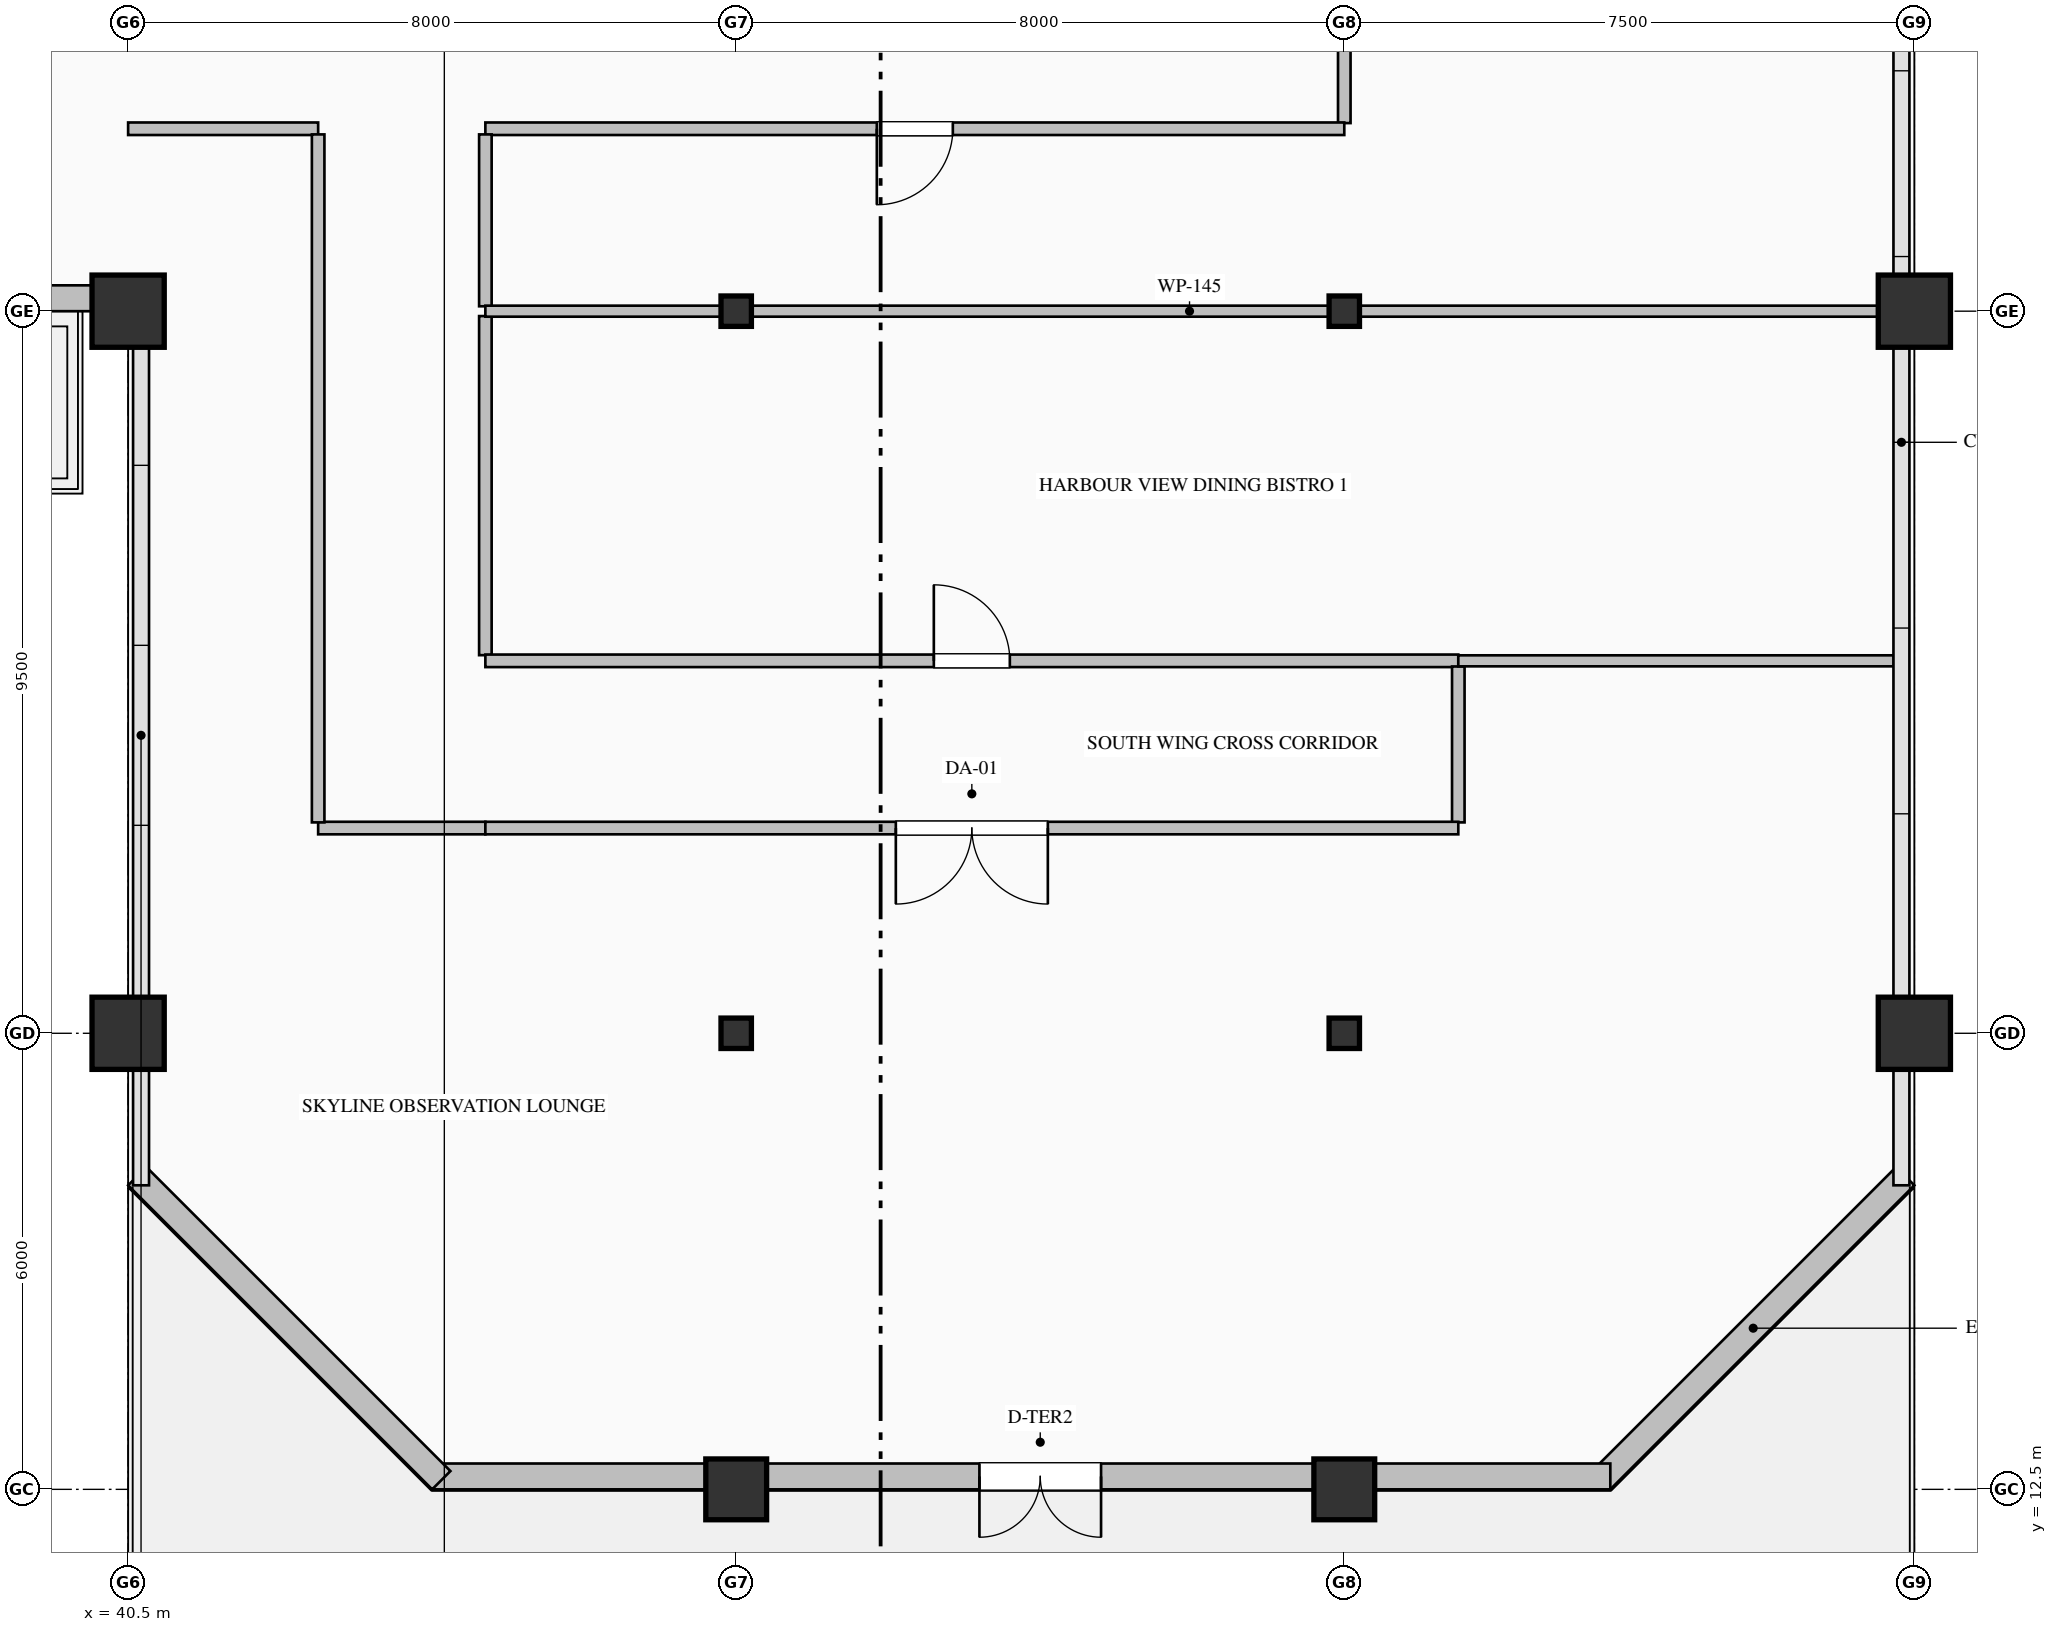
"""IFC4 building model, lengths in metres.
Left out: names, types, materials, properties, quantities, classifications, styles, units other than length and angle.
Written with IfcOpenShell. Run it as: python <this file> out.ifc"""

import sys

from ifc_helpers import new_model, si_unit, direction, frame, frame_2d, origin, origin_2d, place, context, subcontext, project, spatial, rectangle, hollow_rectangle, i_section, extrude, element, fill, save


model = new_model("IFC4")
c1 = context("Model", 3, precision=1e-05, world=origin(), true_north=direction((0.0, 1.0)))
c2 = subcontext(c1, "Body", "Model", "MODEL_VIEW")
j1 = project(units=[si_unit("LENGTHUNIT", "METRE"), si_unit("PLANEANGLEUNIT", "RADIAN")], contexts=[c1])
p1 = place(None, origin())
s1 = spatial("IfcSite", under=j1, at=p1, CompositionType="ELEMENT")
p2 = place(p1, origin())
s2 = spatial("IfcBuilding", under=s1, at=p2, CompositionType="ELEMENT")
p3 = place(p2, frame((0.0, 0.0, 200.4)))
s3 = spatial("IfcBuildingStorey", under=s2, at=p3, CompositionType="ELEMENT", Elevation=200.4)
for number, where, z_axis, x_axis in (
    (1, (40.5, 18.5, 0.0), (0.0, 0.0, 1.0), (1.0, 0.0, 0.0)),
    (2, (40.5, 28.0, 0.0), (0.0, 0.0, 1.0), (1.0, 0.0, 0.0)),
):
    element("IfcColumn", number, at=place(p3, frame(where, z_axis=z_axis, x_axis=x_axis)), inside=s3, PredefinedType="COLUMN", context=c2, shape_type="SweptSolid", body=[
        extrude(hollow_rectangle(XDim=0.95, YDim=0.95, WallThickness=0.036, at=origin_2d()), origin(), (0.0, 0.0, 1.0), 5.4),
    ])
p4 = place(p3, frame((48.5, 12.5, 0.0), z_axis=(0.0, 0.0, 1.0), x_axis=(1.0, 0.0, 0.0)))
e3 = element("IfcColumn", 3, at=p4, inside=s3, PredefinedType="COLUMN", context=c2, shape_type="SweptSolid", body=[
    extrude(hollow_rectangle(XDim=0.8, YDim=0.8, WallThickness=0.032, at=origin_2d()), origin(), (0.0, 0.0, 1.0), 5.4),
])
for number, where, z_axis, x_axis in (
    (4, (48.5, 18.5, 0.0), (0.0, 0.0, 1.0), (1.0, 0.0, 0.0)),
    (5, (48.5, 28.0, 0.0), (0.0, 0.0, 1.0), (1.0, 0.0, 0.0)),
):
    element("IfcColumn", number, at=place(p3, frame(where, z_axis=z_axis, x_axis=x_axis)), inside=s3, PredefinedType="COLUMN", context=c2, shape_type="SweptSolid", body=[
        extrude(i_section(OverallWidth=0.4, OverallDepth=0.4, WebThickness=0.013, FlangeThickness=0.021, FilletRadius=0.022, at=origin_2d()), origin(), (0.0, 0.0, 1.0), 5.4),
    ])
p5 = place(p3, frame((56.5, 12.5, 0.0), z_axis=(0.0, 0.0, 1.0), x_axis=(1.0, 0.0, 0.0)))
e6 = element("IfcColumn", 6, at=p5, inside=s3, PredefinedType="COLUMN", context=c2, shape_type="SweptSolid", body=[
    extrude(hollow_rectangle(XDim=0.8, YDim=0.8, WallThickness=0.032, at=origin_2d()), origin(), (0.0, 0.0, 1.0), 5.4),
])
for number, where, z_axis, x_axis in (
    (7, (56.5, 18.5, 0.0), (0.0, 0.0, 1.0), (1.0, 0.0, 0.0)),
    (8, (56.5, 28.0, 0.0), (0.0, 0.0, 1.0), (1.0, 0.0, 0.0)),
):
    element("IfcColumn", number, at=place(p3, frame(where, z_axis=z_axis, x_axis=x_axis)), inside=s3, PredefinedType="COLUMN", context=c2, shape_type="SweptSolid", body=[
        extrude(i_section(OverallWidth=0.4, OverallDepth=0.4, WebThickness=0.013, FlangeThickness=0.021, FilletRadius=0.022, at=origin_2d()), origin(), (0.0, 0.0, 1.0), 5.4),
    ])
for number, where, z_axis, x_axis in (
    (9, (64.0, 18.5, 0.0), (0.0, 0.0, 1.0), (1.0, 0.0, 0.0)),
    (10, (64.0, 28.0, 0.0), (0.0, 0.0, 1.0), (1.0, 0.0, 0.0)),
):
    element("IfcColumn", number, at=place(p3, frame(where, z_axis=z_axis, x_axis=x_axis)), inside=s3, PredefinedType="COLUMN", context=c2, shape_type="SweptSolid", body=[
        extrude(hollow_rectangle(XDim=0.95, YDim=0.95, WallThickness=0.036, at=origin_2d()), origin(), (0.0, 0.0, 1.0), 5.4),
    ])
p6 = place(p3, frame((40.52, 28.17, 0.0), z_axis=(0.0, 0.0, 1.0), x_axis=(-1.0, 0.0, 0.0)))
e11 = element("IfcWall", 11, at=p6, inside=s3, PredefinedType="SOLIDWALL", context=c2, shape_type="SweptSolid", body=[
    extrude(rectangle(XDim=27.52, YDim=0.34, at=frame_2d((13.76, 0.0))), origin(), (0.0, 0.0, 1.0), 4.587),
])
p7 = place(p6, frame((13.725, 0.0, 0.9)))
e12 = element("IfcOpeningElement", 12, at=p7, cuts=e11, PredefinedType="OPENING", context=c2, shape_type="SweptSolid", body=[
    extrude(rectangle(XDim=1.35, YDim=1.85, at=frame_2d((0.675, 0.925))), frame((0.0, 0.18, 0.0), z_axis=(0.0, -1.0, 0.0), x_axis=(1.0, 0.0, 0.0)), (0.0, 0.0, 1.0), 0.36),
])
p8 = place(p6, frame((17.25, 0.0, 0.7)))
e13 = element("IfcOpeningElement", 13, at=p8, cuts=e11, PredefinedType="OPENING", context=c2, shape_type="SweptSolid", body=[
    extrude(rectangle(XDim=1.5, YDim=2.4, at=frame_2d((0.75, 1.2))), frame((0.0, 0.18, 0.0), z_axis=(0.0, -1.0, 0.0), x_axis=(1.0, 0.0, 0.0)), (0.0, 0.0, 1.0), 0.36),
])
p9 = place(p6, frame((21.0, 0.0, 0.9)))
e14 = element("IfcOpeningElement", 14, at=p9, cuts=e11, PredefinedType="OPENING", context=c2, shape_type="SweptSolid", body=[
    extrude(rectangle(XDim=1.2, YDim=1.85, at=frame_2d((0.6, 0.925))), frame((0.0, 0.18, 0.0), z_axis=(0.0, -1.0, 0.0), x_axis=(1.0, 0.0, 0.0)), (0.0, 0.0, 1.0), 0.36),
])
p10 = place(p6, frame((11.395, 0.0, 0.0)))
e15 = element("IfcOpeningElement", 15, at=p10, cuts=e11, PredefinedType="OPENING", context=c2, shape_type="SweptSolid", body=[
    extrude(rectangle(XDim=1.25, YDim=2.25, at=frame_2d((0.625, 1.125))), frame((0.0, 0.18, 0.0), z_axis=(0.0, -1.0, 0.0), x_axis=(1.0, 0.0, 0.0)), (0.0, 0.0, 1.0), 0.36),
])
p11 = place(p3, frame((63.88, 16.62, 0.0), z_axis=(0.0, 0.0, 1.0), x_axis=(-0.707106781187, -0.707106781187, 0.0)))
e16 = element("IfcWall", 16, at=p11, inside=s3, PredefinedType="SOLIDWALL", context=c2, shape_type="SweptSolid", body=[
    extrude(rectangle(XDim=5.657, YDim=0.34, at=frame_2d((2.828, 0.0))), origin(), (0.0, 0.0, 1.0), 5.175),
])
p12 = place(p3, frame((60.0, 12.67, 0.0), z_axis=(0.0, 0.0, 1.0), x_axis=(-1.0, 0.0, 0.0)))
e17 = element("IfcWall", 17, at=p12, inside=s3, PredefinedType="SOLIDWALL", context=c2, shape_type="SweptSolid", body=[
    extrude(rectangle(XDim=15.5, YDim=0.34, at=frame_2d((7.75, 0.0))), origin(), (0.0, 0.0, 1.0), 4.725),
])
p13 = place(p12, frame((6.7, 0.0, 0.0)))
e18 = element("IfcOpeningElement", 18, at=p13, cuts=e17, PredefinedType="OPENING", context=c2, shape_type="SweptSolid", body=[
    extrude(rectangle(XDim=1.6, YDim=2.35, at=frame_2d((0.8, 1.175))), frame((0.0, 0.18, 0.0), z_axis=(0.0, -1.0, 0.0), x_axis=(1.0, 0.0, 0.0)), (0.0, 0.0, 1.0), 0.36),
])
p14 = place(p3, frame((44.62, 12.62, 0.0), z_axis=(0.0, 0.0, 1.0), x_axis=(-0.707106781187, 0.707106781187, 0.0)))
e19 = element("IfcWall", 19, at=p14, inside=s3, PredefinedType="SOLIDWALL", context=c2, shape_type="SweptSolid", body=[
    extrude(rectangle(XDim=5.657, YDim=0.34, at=frame_2d((2.828, 0.0))), origin(), (0.0, 0.0, 1.0), 5.175),
])
p15 = place(p3, frame((56.5, 36.0, 0.0), z_axis=(0.0, 0.0, 1.0), x_axis=(0.0, -1.0, 0.0)))
e20 = element("IfcWall", 20, at=p15, inside=s3, PredefinedType="PARTITIONING", context=c2, shape_type="SweptSolid", body=[
    extrude(rectangle(XDim=5.525, YDim=0.165, at=frame_2d((2.763, 0.0))), origin(), (0.0, 0.0, 1.0), 4.579),
])
p16 = place(p3, frame((56.5, 30.4, 0.0), z_axis=(0.0, 0.0, 1.0), x_axis=(-1.0, 0.0, 0.0)))
e21 = element("IfcWall", 21, at=p16, inside=s3, PredefinedType="PARTITIONING", context=c2, shape_type="SweptSolid", body=[
    extrude(rectangle(XDim=11.3, YDim=0.165, at=frame_2d((5.65, 0.0))), origin(), (0.0, 0.0, 1.0), 5.175),
])
p17 = place(p16, frame((5.15, 0.0, 0.0)))
e22 = element("IfcOpeningElement", 22, at=p17, cuts=e21, PredefinedType="OPENING", context=c2, shape_type="SweptSolid", body=[
    extrude(rectangle(XDim=1.0, YDim=2.15, at=frame_2d((0.5, 1.075))), frame((0.0, 0.093, 0.0), z_axis=(0.0, -1.0, 0.0), x_axis=(1.0, 0.0, 0.0)), (0.0, 0.0, 1.0), 0.185),
])
p18 = place(p3, frame((43.0, 30.4, 0.0), z_axis=(0.0, 0.0, 1.0), x_axis=(-1.0, 0.0, 0.0)))
e23 = element("IfcWall", 23, at=p18, inside=s3, PredefinedType="PARTITIONING", context=c2, shape_type="SweptSolid", body=[
    extrude(rectangle(XDim=2.5, YDim=0.165, at=frame_2d((1.25, 0.0))), origin(), (0.0, 0.0, 1.0), 5.175),
])
p19 = place(p3, frame((45.2, 27.936, 0.0), z_axis=(0.0, 0.0, 1.0), x_axis=(0.0, -1.0, 0.0)))
e24 = element("IfcWall", 24, at=p19, inside=s3, PredefinedType="PARTITIONING", context=c2, shape_type="SweptSolid", body=[
    extrude(rectangle(XDim=4.461, YDim=0.165, at=frame_2d((2.23, 0.0))), origin(), (0.0, 0.0, 1.0), 5.175),
])
p20 = place(p3, frame((45.2, 30.325, 0.0), z_axis=(0.0, 0.0, 1.0), x_axis=(0.0, -1.0, 0.0)))
e25 = element("IfcWall", 25, at=p20, inside=s3, PredefinedType="PARTITIONING", context=c2, shape_type="SweptSolid", body=[
    extrude(rectangle(XDim=2.261, YDim=0.165, at=frame_2d((1.13, 0.0))), origin(), (0.0, 0.0, 1.0), 5.175),
])
p21 = place(p3, frame((45.2, 21.2, 0.0), z_axis=(0.0, 0.0, 1.0), x_axis=(-1.0, 0.0, 0.0)))
e26 = element("IfcWall", 26, at=p21, inside=s3, PredefinedType="PARTITIONING", context=c2, shape_type="SweptSolid", body=[
    extrude(rectangle(XDim=2.2, YDim=0.165, at=frame_2d((1.1, 0.0))), origin(), (0.0, 0.0, 1.0), 5.175),
])
p22 = place(p3, frame((43.0, 21.274, 0.0), z_axis=(0.0, 0.0, 1.0), x_axis=(0.0, 1.0, 0.0)))
e27 = element("IfcWall", 27, at=p22, inside=s3, PredefinedType="PARTITIONING", context=c2, shape_type="SweptSolid", body=[
    extrude(rectangle(XDim=9.051, YDim=0.165, at=frame_2d((4.525, 0.0))), origin(), (0.0, 0.0, 1.0), 5.175),
])
p23 = place(p3, frame((45.2, 23.4, 0.0), z_axis=(0.0, 0.0, 1.0), x_axis=(1.0, 0.0, 0.0)))
e28 = element("IfcWall", 28, at=p23, inside=s3, PredefinedType="PARTITIONING", context=c2, shape_type="SweptSolid", body=[
    extrude(rectangle(XDim=12.8, YDim=0.165, at=frame_2d((6.4, 0.0))), origin(), (0.0, 0.0, 1.0), 4.867),
])
p24 = place(p23, frame((5.9, 0.0, 0.0)))
e29 = element("IfcOpeningElement", 29, at=p24, cuts=e28, PredefinedType="OPENING", context=c2, shape_type="SweptSolid", body=[
    extrude(rectangle(XDim=1.0, YDim=2.15, at=frame_2d((0.5, 1.075))), frame((0.0, 0.093, 0.0), z_axis=(0.0, -1.0, 0.0), x_axis=(1.0, 0.0, 0.0)), (0.0, 0.0, 1.0), 0.185),
])
p25 = place(p3, frame((58.0, 23.325, 0.0), z_axis=(0.0, 0.0, 1.0), x_axis=(0.0, -1.0, 0.0)))
e30 = element("IfcWall", 30, at=p25, inside=s3, PredefinedType="PARTITIONING", context=c2, shape_type="SweptSolid", body=[
    extrude(rectangle(XDim=2.051, YDim=0.165, at=frame_2d((1.025, 0.0))), origin(), (0.0, 0.0, 1.0), 5.175),
])
p26 = place(p3, frame((58.0, 21.2, 0.0), z_axis=(0.0, 0.0, 1.0), x_axis=(-1.0, 0.0, 0.0)))
e31 = element("IfcWall", 31, at=p26, inside=s3, PredefinedType="PARTITIONING", context=c2, shape_type="SweptSolid", body=[
    extrude(rectangle(XDim=12.8, YDim=0.165, at=frame_2d((6.4, 0.0))), origin(), (0.0, 0.0, 1.0), 5.175),
])
p27 = place(p26, frame((5.4, 0.0, 0.0)))
e32 = element("IfcOpeningElement", 32, at=p27, cuts=e31, PredefinedType="OPENING", context=c2, shape_type="SweptSolid", body=[
    extrude(rectangle(XDim=2.0, YDim=2.4, at=frame_2d((1.0, 1.2))), frame((0.0, 0.093, 0.0), z_axis=(0.0, -1.0, 0.0), x_axis=(1.0, 0.0, 0.0)), (0.0, 0.0, 1.0), 0.185),
])
p28 = place(p3, frame((45.2, 28.0, 0.0), z_axis=(0.0, 0.0, 1.0), x_axis=(1.0, 0.0, 0.0)))
e33 = element("IfcWall", 33, at=p28, inside=s3, PredefinedType="PARTITIONING", context=c2, shape_type="SweptSolid", body=[
    extrude(rectangle(XDim=18.528, YDim=0.145, at=frame_2d((9.264, 0.0))), origin(), (0.0, 0.0, 1.0), 4.579),
])
p29 = place(p3, frame((63.728, 23.4, 0.0), z_axis=(0.0, 0.0, 1.0), x_axis=(-1.0, 0.0, 0.0)))
e34 = element("IfcWall", 34, at=p29, inside=s3, PredefinedType="PARTITIONING", context=c2, shape_type="SweptSolid", body=[
    extrude(rectangle(XDim=5.728, YDim=0.145, at=frame_2d((2.864, 0.0))), origin(), (0.0, 0.0, 1.0), 5.175),
])
p30 = place(p13, origin())
e35 = element("IfcDoor", 35, at=p30, inside=s3, OperationType="DOUBLE_DOOR_SINGLE_SWING", PredefinedType="DOOR", context=c2, shape_type="SweptSolid", body=[
    extrude(rectangle(XDim=1.6, YDim=2.35, at=frame_2d((0.8, 1.175))), frame((0.0, 0.025, 0.0), z_axis=(0.0, -1.0, 0.0), x_axis=(1.0, 0.0, 0.0)), (0.0, 0.0, 1.0), 0.05),
])
fill(e18, e35)
p31 = place(p24, origin())
e36 = element("IfcDoor", 36, at=p31, inside=s3, OperationType="SINGLE_SWING_LEFT", PredefinedType="DOOR", context=c2, shape_type="SweptSolid", body=[
    extrude(rectangle(XDim=1.0, YDim=2.15, at=frame_2d((0.5, 1.075))), frame((0.0, 0.025, 0.0), z_axis=(0.0, -1.0, 0.0), x_axis=(1.0, 0.0, 0.0)), (0.0, 0.0, 1.0), 0.05),
])
fill(e29, e36)
p32 = place(p17, origin())
e37 = element("IfcDoor", 37, at=p32, inside=s3, OperationType="SINGLE_SWING_RIGHT", PredefinedType="DOOR", context=c2, shape_type="SweptSolid", body=[
    extrude(rectangle(XDim=1.0, YDim=2.15, at=frame_2d((0.5, 1.075))), frame((0.0, 0.025, 0.0), z_axis=(0.0, -1.0, 0.0), x_axis=(1.0, 0.0, 0.0)), (0.0, 0.0, 1.0), 0.05),
])
fill(e22, e37)
p33 = place(p27, origin())
e38 = element("IfcDoor", 38, at=p33, inside=s3, OperationType="DOUBLE_DOOR_SINGLE_SWING", PredefinedType="DOOR", context=c2, shape_type="SweptSolid", body=[
    extrude(rectangle(XDim=2.0, YDim=2.4, at=frame_2d((1.0, 1.2))), frame((0.0, 0.025, 0.0), z_axis=(0.0, -1.0, 0.0), x_axis=(1.0, 0.0, 0.0)), (0.0, 0.0, 1.0), 0.05),
])
fill(e32, e38)
save(model, sys.argv[1])
